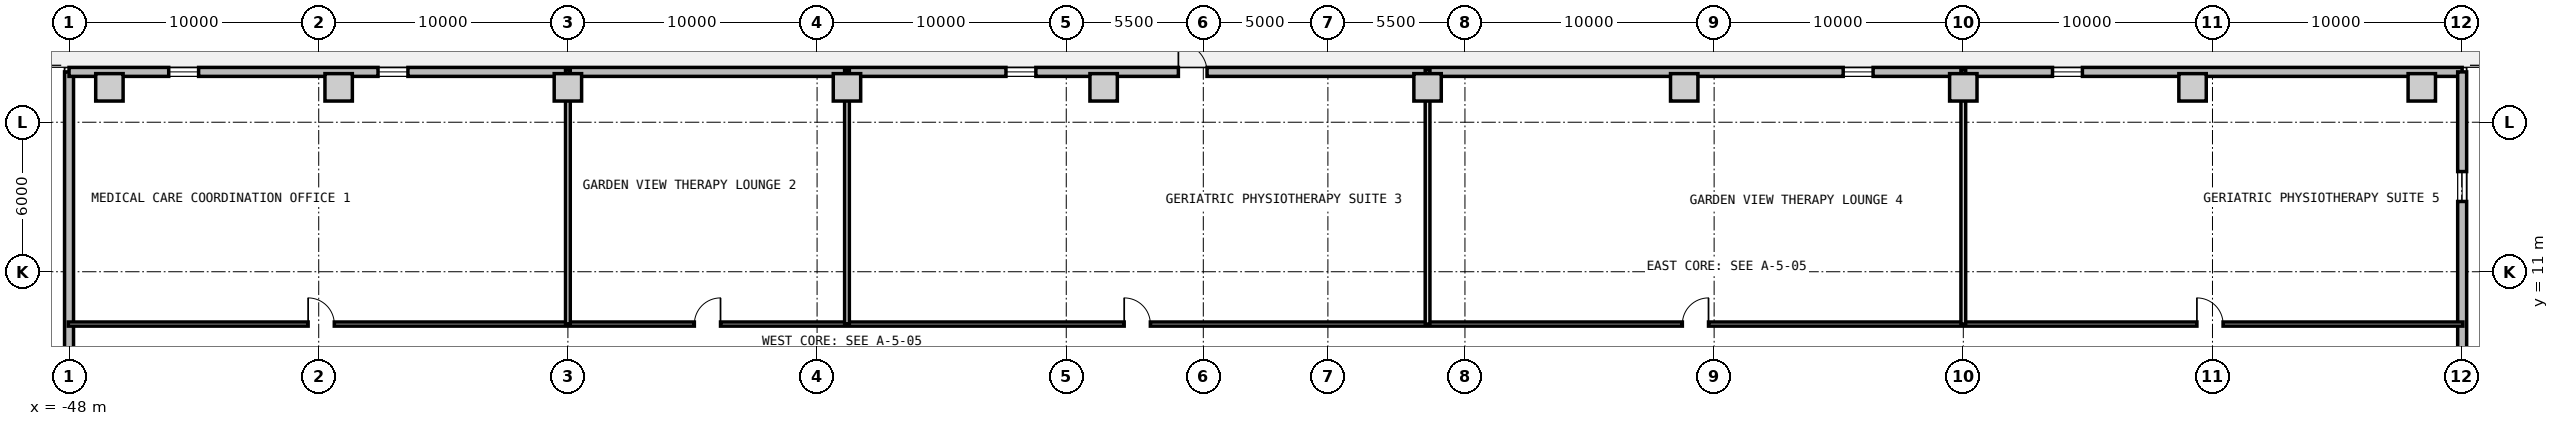
"""IFC4 building model, lengths in metres.
Left out: names, types, materials, properties, quantities, classifications, styles, units other than length and angle.
Written with IfcOpenShell. Run it as: python <this file> out.ifc"""

import sys

from ifc_helpers import new_model, si_unit, direction, frame, frame_2d, origin, origin_2d, place, context, subcontext, project, spatial, rectangle, extrude, source, transform, mapped, element, fill, save


model = new_model("IFC4")
c1 = context("Model", 3, precision=1e-05, world=origin(), true_north=direction((0.0, 1.0)))
c2 = subcontext(c1, "Body", "Model", "MODEL_VIEW")
j1 = project(units=[si_unit("LENGTHUNIT", "METRE"), si_unit("PLANEANGLEUNIT", "RADIAN")], contexts=[c1])
p1 = place(None, origin())
s1 = spatial("IfcSite", under=j1, at=p1, CompositionType="ELEMENT")
p2 = place(p1, origin())
s2 = spatial("IfcBuilding", under=s1, at=p2, CompositionType="ELEMENT")
p3 = place(p2, frame((0.0, 0.0, 16.8)))
s3 = spatial("IfcBuildingStorey", under=s2, at=p3, CompositionType="ELEMENT", Elevation=16.8)
m1 = source(origin(), c2, "Body", "SweptSolid", [
    extrude(rectangle(XDim=1.1, YDim=1.1, at=origin_2d()), origin(), (0.0, 0.0, 1.0), 4.38),
])
for number, where, z_axis, x_axis in (
    (1, (-46.4, 18.4, 0.0), (0.0, 0.0, 1.0), (1.0, 0.0, 0.0)),
    (2, (-37.2, 18.4, 0.0), (0.0, 0.0, 1.0), (1.0, 0.0, 0.0)),
    (3, (-28.0, 18.4, 0.0), (0.0, 0.0, 1.0), (1.0, 0.0, 0.0)),
    (4, (-16.8, 18.4, 0.0), (0.0, 0.0, 1.0), (1.0, 0.0, 0.0)),
    (5, (-6.5, 18.4, 0.0), (0.0, 0.0, 1.0), (1.0, 0.0, 0.0)),
    (6, (6.5, 18.4, 0.0), (0.0, 0.0, 1.0), (1.0, 0.0, 0.0)),
    (7, (16.8, 18.4, 0.0), (0.0, 0.0, 1.0), (1.0, 0.0, 0.0)),
    (8, (28.0, 18.4, 0.0), (0.0, 0.0, 1.0), (1.0, 0.0, 0.0)),
    (9, (37.2, 18.4, 0.0), (0.0, 0.0, 1.0), (1.0, 0.0, 0.0)),
    (10, (46.4, 18.4, 0.0), (0.0, 0.0, 1.0), (1.0, 0.0, 0.0)),
):
    element("IfcColumn", number, at=place(p3, frame(where, z_axis=z_axis, x_axis=x_axis)), inside=s3, PredefinedType="COLUMN", context=c2, shape_type="MappedRepresentation", body=[
        mapped(m1, transform((0.0, 0.0, 0.0), x_axis=(1.0, 0.0, 0.0), y_axis=(0.0, 1.0, 0.0), z_axis=(0.0, 0.0, 1.0), scale=1.0)),
    ])
m2 = source(origin(), c2, "Body", "SweptSolid", [
    extrude(rectangle(XDim=38.04, YDim=0.36, at=frame_2d((19.02, 0.0))), origin(), (0.0, 0.0, 1.0), 4.38),
])
p4 = place(p3, frame((-48.02, -19.02, 0.0), z_axis=(0.0, 0.0, 1.0), x_axis=(0.0, 1.0, 0.0)))
e11 = element("IfcWall", 11, at=p4, inside=s3, PredefinedType="SOLIDWALL", context=c2, shape_type="MappedRepresentation", body=[
    mapped(m2, transform((0.0, 0.0, 0.0), x_axis=(1.0, 0.0, 0.0), y_axis=(0.0, 1.0, 0.0), z_axis=(0.0, 0.0, 1.0), scale=1.0)),
])
p5 = place(p4, frame((12.4, 0.0, 0.85)))
e12 = element("IfcOpeningElement", 12, at=p5, cuts=e11, PredefinedType="OPENING", context=c2, shape_type="SweptSolid", body=[
    extrude(rectangle(XDim=1.2, YDim=1.5, at=frame_2d((0.6, 0.75))), frame((0.0, 0.19, 0.0), z_axis=(0.0, -1.0, 0.0), x_axis=(1.0, 0.0, 0.0)), (0.0, 0.0, 1.0), 0.38),
])
p6 = place(p4, frame((20.8, 0.0, 0.85)))
e13 = element("IfcOpeningElement", 13, at=p6, cuts=e11, PredefinedType="OPENING", context=c2, shape_type="SweptSolid", body=[
    extrude(rectangle(XDim=1.2, YDim=1.5, at=frame_2d((0.6, 0.75))), frame((0.0, 0.19, 0.0), z_axis=(0.0, -1.0, 0.0), x_axis=(1.0, 0.0, 0.0)), (0.0, 0.0, 1.0), 0.38),
])
m3 = source(origin(), c2, "Body", "SweptSolid", [
    extrude(rectangle(XDim=96.04, YDim=0.36, at=frame_2d((48.02, 0.0))), origin(), (0.0, 0.0, 1.0), 4.38),
])
p7 = place(p3, frame((-48.02, 19.02, 0.0), z_axis=(0.0, 0.0, 1.0), x_axis=(1.0, 0.0, 0.0)))
e14 = element("IfcWall", 14, at=p7, inside=s3, PredefinedType="SOLIDWALL", context=c2, shape_type="MappedRepresentation", body=[
    mapped(m3, transform((0.0, 0.0, 0.0), x_axis=(1.0, 0.0, 0.0), y_axis=(0.0, 1.0, 0.0), z_axis=(0.0, 0.0, 1.0), scale=1.0)),
])
p8 = place(p7, frame((44.52, 0.0, 0.0)))
e15 = element("IfcOpeningElement", 15, at=p8, cuts=e14, PredefinedType="OPENING", context=c2, shape_type="SweptSolid", body=[
    extrude(rectangle(XDim=1.15, YDim=2.25, at=frame_2d((0.575, 1.125))), frame((0.0, 0.19, 0.0), z_axis=(0.0, -1.0, 0.0), x_axis=(1.0, 0.0, 0.0)), (0.0, 0.0, 1.0), 0.38),
])
p9 = place(p7, frame((4.0, 0.0, 0.85)))
e16 = element("IfcOpeningElement", 16, at=p9, cuts=e14, PredefinedType="OPENING", context=c2, shape_type="SweptSolid", body=[
    extrude(rectangle(XDim=1.2, YDim=1.5, at=frame_2d((0.6, 0.75))), frame((0.0, 0.19, 0.0), z_axis=(0.0, -1.0, 0.0), x_axis=(1.0, 0.0, 0.0)), (0.0, 0.0, 1.0), 0.38),
])
p10 = place(p7, frame((12.4, 0.0, 0.85)))
e17 = element("IfcOpeningElement", 17, at=p10, cuts=e14, PredefinedType="OPENING", context=c2, shape_type="SweptSolid", body=[
    extrude(rectangle(XDim=1.2, YDim=1.5, at=frame_2d((0.6, 0.75))), frame((0.0, 0.19, 0.0), z_axis=(0.0, -1.0, 0.0), x_axis=(1.0, 0.0, 0.0)), (0.0, 0.0, 1.0), 0.38),
])
p11 = place(p7, frame((37.6, 0.0, 0.85)))
e18 = element("IfcOpeningElement", 18, at=p11, cuts=e14, PredefinedType="OPENING", context=c2, shape_type="SweptSolid", body=[
    extrude(rectangle(XDim=1.2, YDim=1.5, at=frame_2d((0.6, 0.75))), frame((0.0, 0.19, 0.0), z_axis=(0.0, -1.0, 0.0), x_axis=(1.0, 0.0, 0.0)), (0.0, 0.0, 1.0), 0.38),
])
p12 = place(p7, frame((71.2, 0.0, 0.85)))
e19 = element("IfcOpeningElement", 19, at=p12, cuts=e14, PredefinedType="OPENING", context=c2, shape_type="SweptSolid", body=[
    extrude(rectangle(XDim=1.2, YDim=1.5, at=frame_2d((0.6, 0.75))), frame((0.0, 0.19, 0.0), z_axis=(0.0, -1.0, 0.0), x_axis=(1.0, 0.0, 0.0)), (0.0, 0.0, 1.0), 0.38),
])
p13 = place(p7, frame((79.6, 0.0, 0.85)))
e20 = element("IfcOpeningElement", 20, at=p13, cuts=e14, PredefinedType="OPENING", context=c2, shape_type="SweptSolid", body=[
    extrude(rectangle(XDim=1.2, YDim=1.5, at=frame_2d((0.6, 0.75))), frame((0.0, 0.19, 0.0), z_axis=(0.0, -1.0, 0.0), x_axis=(1.0, 0.0, 0.0)), (0.0, 0.0, 1.0), 0.38),
])
p14 = place(p3, frame((48.02, 19.02, 0.0), z_axis=(0.0, 0.0, 1.0), x_axis=(0.0, -1.0, 0.0)))
e21 = element("IfcWall", 21, at=p14, inside=s3, PredefinedType="SOLIDWALL", context=c2, shape_type="MappedRepresentation", body=[
    mapped(m2, transform((0.0, 0.0, 0.0), x_axis=(1.0, 0.0, 0.0), y_axis=(0.0, 1.0, 0.0), z_axis=(0.0, 0.0, 1.0), scale=1.0)),
])
p15 = place(p14, frame((4.0, 0.0, 0.85)))
e22 = element("IfcOpeningElement", 22, at=p15, cuts=e21, PredefinedType="OPENING", context=c2, shape_type="SweptSolid", body=[
    extrude(rectangle(XDim=1.2, YDim=1.5, at=frame_2d((0.6, 0.75))), frame((0.0, 0.19, 0.0), z_axis=(0.0, -1.0, 0.0), x_axis=(1.0, 0.0, 0.0)), (0.0, 0.0, 1.0), 0.38),
])
p16 = place(p14, frame((12.4, 0.0, 0.85)))
e23 = element("IfcOpeningElement", 23, at=p16, cuts=e21, PredefinedType="OPENING", context=c2, shape_type="SweptSolid", body=[
    extrude(rectangle(XDim=1.2, YDim=1.5, at=frame_2d((0.6, 0.75))), frame((0.0, 0.19, 0.0), z_axis=(0.0, -1.0, 0.0), x_axis=(1.0, 0.0, 0.0)), (0.0, 0.0, 1.0), 0.38),
])
p17 = place(p14, frame((20.8, 0.0, 0.85)))
e24 = element("IfcOpeningElement", 24, at=p17, cuts=e21, PredefinedType="OPENING", context=c2, shape_type="SweptSolid", body=[
    extrude(rectangle(XDim=1.2, YDim=1.5, at=frame_2d((0.6, 0.75))), frame((0.0, 0.19, 0.0), z_axis=(0.0, -1.0, 0.0), x_axis=(1.0, 0.0, 0.0)), (0.0, 0.0, 1.0), 0.38),
])
m4 = source(origin(), c2, "Body", "SweptSolid", [
    extrude(rectangle(XDim=96.1, YDim=0.165, at=frame_2d((48.05, 0.0))), origin(), (0.0, 0.0, 1.0), 4.365),
])
p18 = place(p3, frame((-48.05, 8.9, 0.0), z_axis=(0.0, 0.0, 1.0), x_axis=(1.0, 0.0, 0.0)))
e25 = element("IfcWall", 25, at=p18, inside=s3, PredefinedType="PARTITIONING", context=c2, shape_type="MappedRepresentation", body=[
    mapped(m4, transform((0.0, 0.0, 0.0), x_axis=(1.0, 0.0, 0.0), y_axis=(0.0, 1.0, 0.0), z_axis=(0.0, 0.0, 1.0), scale=1.0)),
])
p19 = place(p18, frame((9.625, 0.0, 0.0)))
e26 = element("IfcOpeningElement", 26, at=p19, cuts=e25, PredefinedType="OPENING", context=c2, shape_type="SweptSolid", body=[
    extrude(rectangle(XDim=1.05, YDim=2.15, at=frame_2d((0.525, 1.075))), frame((0.0, 0.093, 0.0), z_axis=(0.0, -1.0, 0.0), x_axis=(1.0, 0.0, 0.0)), (0.0, 0.0, 1.0), 0.185),
])
p20 = place(p18, frame((25.125, 0.0, 0.0)))
e27 = element("IfcOpeningElement", 27, at=p20, cuts=e25, PredefinedType="OPENING", context=c2, shape_type="SweptSolid", body=[
    extrude(rectangle(XDim=1.05, YDim=2.15, at=frame_2d((0.525, 1.075))), frame((0.0, 0.093, 0.0), z_axis=(0.0, -1.0, 0.0), x_axis=(1.0, 0.0, 0.0)), (0.0, 0.0, 1.0), 0.185),
])
p21 = place(p18, frame((42.375, 0.0, 0.0)))
e28 = element("IfcOpeningElement", 28, at=p21, cuts=e25, PredefinedType="OPENING", context=c2, shape_type="SweptSolid", body=[
    extrude(rectangle(XDim=1.05, YDim=2.15, at=frame_2d((0.525, 1.075))), frame((0.0, 0.093, 0.0), z_axis=(0.0, -1.0, 0.0), x_axis=(1.0, 0.0, 0.0)), (0.0, 0.0, 1.0), 0.185),
])
p22 = place(p18, frame((64.775, 0.0, 0.0)))
e29 = element("IfcOpeningElement", 29, at=p22, cuts=e25, PredefinedType="OPENING", context=c2, shape_type="SweptSolid", body=[
    extrude(rectangle(XDim=1.05, YDim=2.15, at=frame_2d((0.525, 1.075))), frame((0.0, 0.093, 0.0), z_axis=(0.0, -1.0, 0.0), x_axis=(1.0, 0.0, 0.0)), (0.0, 0.0, 1.0), 0.185),
])
p23 = place(p18, frame((85.425, 0.0, 0.0)))
e30 = element("IfcOpeningElement", 30, at=p23, cuts=e25, PredefinedType="OPENING", context=c2, shape_type="SweptSolid", body=[
    extrude(rectangle(XDim=1.05, YDim=2.15, at=frame_2d((0.525, 1.075))), frame((0.0, 0.093, 0.0), z_axis=(0.0, -1.0, 0.0), x_axis=(1.0, 0.0, 0.0)), (0.0, 0.0, 1.0), 0.185),
])
m5 = source(origin(), c2, "Body", "SweptSolid", [
    extrude(rectangle(XDim=10.2, YDim=0.19, at=frame_2d((5.1, 0.0))), origin(), (0.0, 0.0, 1.0), 4.365),
])
p24 = place(p3, frame((-28.0, 8.9, 0.0), z_axis=(0.0, 0.0, 1.0), x_axis=(0.0, 1.0, 0.0)))
e31 = element("IfcWall", 31, at=p24, inside=s3, PredefinedType="PARTITIONING", context=c2, shape_type="MappedRepresentation", body=[
    mapped(m5, transform((0.0, 0.0, 0.0), x_axis=(1.0, 0.0, 0.0), y_axis=(0.0, 1.0, 0.0), z_axis=(0.0, 0.0, 1.0), scale=1.0)),
])
m6 = source(origin(), c2, "Body", "SweptSolid", [
    extrude(rectangle(XDim=10.2, YDim=0.19, at=frame_2d((5.1, 0.0))), origin(), (0.0, 0.0, 1.0), 2.765),
])
for number, where, z_axis, x_axis in (
    (32, (-16.8, 8.9, 0.0), (0.0, 0.0, 1.0), (0.0, 1.0, 0.0)),
    (33, (6.5, 8.9, 0.0), (0.0, 0.0, 1.0), (0.0, 1.0, 0.0)),
):
    element("IfcWall", number, at=place(p3, frame(where, z_axis=z_axis, x_axis=x_axis)), inside=s3, PredefinedType="PARTITIONING", context=c2, shape_type="MappedRepresentation", body=[
        mapped(m6, transform((0.0, 0.0, 0.0), x_axis=(1.0, 0.0, 0.0), y_axis=(0.0, 1.0, 0.0), z_axis=(0.0, 0.0, 1.0), scale=1.0)),
    ])
p25 = place(p3, frame((28.0, 8.9, 0.0), z_axis=(0.0, 0.0, 1.0), x_axis=(0.0, 1.0, 0.0)))
e34 = element("IfcWall", 34, at=p25, inside=s3, PredefinedType="PARTITIONING", context=c2, shape_type="MappedRepresentation", body=[
    mapped(m5, transform((0.0, 0.0, 0.0), x_axis=(1.0, 0.0, 0.0), y_axis=(0.0, 1.0, 0.0), z_axis=(0.0, 0.0, 1.0), scale=1.0)),
])
m7 = source(origin(), c2, "Body", "SweptSolid", [
    extrude(rectangle(XDim=1.15, YDim=2.25, at=frame_2d((0.575, 1.125))), frame((0.0, 0.025, 0.0), z_axis=(0.0, -1.0, 0.0), x_axis=(1.0, 0.0, 0.0)), (0.0, 0.0, 1.0), 0.05),
])
p26 = place(p8, origin())
e35 = element("IfcDoor", 35, at=p26, inside=s3, OperationType="SINGLE_SWING_LEFT", PredefinedType="DOOR", context=c2, shape_type="MappedRepresentation", body=[
    mapped(m7, transform((0.0, 0.0, 0.0), x_axis=(1.0, 0.0, 0.0), y_axis=(0.0, 1.0, 0.0), z_axis=(0.0, 0.0, 1.0), scale=1.0)),
])
fill(e15, e35)
m8 = source(origin(), c2, "Body", "SweptSolid", [
    extrude(rectangle(XDim=1.2, YDim=1.5, at=frame_2d((0.6, 0.75))), frame((0.0, 0.03, 0.0), z_axis=(0.0, -1.0, 0.0), x_axis=(1.0, 0.0, 0.0)), (0.0, 0.0, 1.0), 0.06),
])
p27 = place(p9, origin())
e36 = element("IfcWindow", 36, at=p27, inside=s3, PartitioningType="SINGLE_PANEL", PredefinedType="WINDOW", context=c2, shape_type="MappedRepresentation", body=[
    mapped(m8, transform((0.0, 0.0, 0.0), x_axis=(1.0, 0.0, 0.0), y_axis=(0.0, 1.0, 0.0), z_axis=(0.0, 0.0, 1.0), scale=1.0)),
])
fill(e16, e36)
p28 = place(p10, origin())
e37 = element("IfcWindow", 37, at=p28, inside=s3, PartitioningType="SINGLE_PANEL", PredefinedType="WINDOW", context=c2, shape_type="MappedRepresentation", body=[
    mapped(m8, transform((0.0, 0.0, 0.0), x_axis=(1.0, 0.0, 0.0), y_axis=(0.0, 1.0, 0.0), z_axis=(0.0, 0.0, 1.0), scale=1.0)),
])
fill(e17, e37)
p29 = place(p11, origin())
e38 = element("IfcWindow", 38, at=p29, inside=s3, PartitioningType="SINGLE_PANEL", PredefinedType="WINDOW", context=c2, shape_type="MappedRepresentation", body=[
    mapped(m8, transform((0.0, 0.0, 0.0), x_axis=(1.0, 0.0, 0.0), y_axis=(0.0, 1.0, 0.0), z_axis=(0.0, 0.0, 1.0), scale=1.0)),
])
fill(e18, e38)
p30 = place(p12, origin())
e39 = element("IfcWindow", 39, at=p30, inside=s3, PartitioningType="SINGLE_PANEL", PredefinedType="WINDOW", context=c2, shape_type="MappedRepresentation", body=[
    mapped(m8, transform((0.0, 0.0, 0.0), x_axis=(1.0, 0.0, 0.0), y_axis=(0.0, 1.0, 0.0), z_axis=(0.0, 0.0, 1.0), scale=1.0)),
])
fill(e19, e39)
p31 = place(p13, origin())
e40 = element("IfcWindow", 40, at=p31, inside=s3, PartitioningType="SINGLE_PANEL", PredefinedType="WINDOW", context=c2, shape_type="MappedRepresentation", body=[
    mapped(m8, transform((0.0, 0.0, 0.0), x_axis=(1.0, 0.0, 0.0), y_axis=(0.0, 1.0, 0.0), z_axis=(0.0, 0.0, 1.0), scale=1.0)),
])
fill(e20, e40)
p32 = place(p15, origin())
e41 = element("IfcWindow", 41, at=p32, inside=s3, PartitioningType="SINGLE_PANEL", PredefinedType="WINDOW", context=c2, shape_type="MappedRepresentation", body=[
    mapped(m8, transform((0.0, 0.0, 0.0), x_axis=(1.0, 0.0, 0.0), y_axis=(0.0, 1.0, 0.0), z_axis=(0.0, 0.0, 1.0), scale=1.0)),
])
fill(e22, e41)
m9 = source(origin(), c2, "Body", "SweptSolid", [
    extrude(rectangle(XDim=1.05, YDim=2.15, at=frame_2d((0.525, 1.075))), frame((0.0, 0.025, 0.0), z_axis=(0.0, -1.0, 0.0), x_axis=(1.0, 0.0, 0.0)), (0.0, 0.0, 1.0), 0.05),
])
p33 = place(p19, origin())
e42 = element("IfcDoor", 42, at=p33, inside=s3, OperationType="SINGLE_SWING_LEFT", PredefinedType="DOOR", context=c2, shape_type="MappedRepresentation", body=[
    mapped(m9, transform((0.0, 0.0, 0.0), x_axis=(1.0, 0.0, 0.0), y_axis=(0.0, 1.0, 0.0), z_axis=(0.0, 0.0, 1.0), scale=1.0)),
])
fill(e26, e42)
p34 = place(p20, origin())
e43 = element("IfcDoor", 43, at=p34, inside=s3, OperationType="SINGLE_SWING_RIGHT", PredefinedType="DOOR", context=c2, shape_type="MappedRepresentation", body=[
    mapped(m9, transform((0.0, 0.0, 0.0), x_axis=(1.0, 0.0, 0.0), y_axis=(0.0, 1.0, 0.0), z_axis=(0.0, 0.0, 1.0), scale=1.0)),
])
fill(e27, e43)
p35 = place(p21, origin())
e44 = element("IfcDoor", 44, at=p35, inside=s3, OperationType="SINGLE_SWING_LEFT", PredefinedType="DOOR", context=c2, shape_type="MappedRepresentation", body=[
    mapped(m9, transform((0.0, 0.0, 0.0), x_axis=(1.0, 0.0, 0.0), y_axis=(0.0, 1.0, 0.0), z_axis=(0.0, 0.0, 1.0), scale=1.0)),
])
fill(e28, e44)
p36 = place(p22, origin())
e45 = element("IfcDoor", 45, at=p36, inside=s3, OperationType="SINGLE_SWING_RIGHT", PredefinedType="DOOR", context=c2, shape_type="MappedRepresentation", body=[
    mapped(m9, transform((0.0, 0.0, 0.0), x_axis=(1.0, 0.0, 0.0), y_axis=(0.0, 1.0, 0.0), z_axis=(0.0, 0.0, 1.0), scale=1.0)),
])
fill(e29, e45)
p37 = place(p23, origin())
e46 = element("IfcDoor", 46, at=p37, inside=s3, OperationType="SINGLE_SWING_LEFT", PredefinedType="DOOR", context=c2, shape_type="MappedRepresentation", body=[
    mapped(m9, transform((0.0, 0.0, 0.0), x_axis=(1.0, 0.0, 0.0), y_axis=(0.0, 1.0, 0.0), z_axis=(0.0, 0.0, 1.0), scale=1.0)),
])
fill(e30, e46)
save(model, sys.argv[1])
